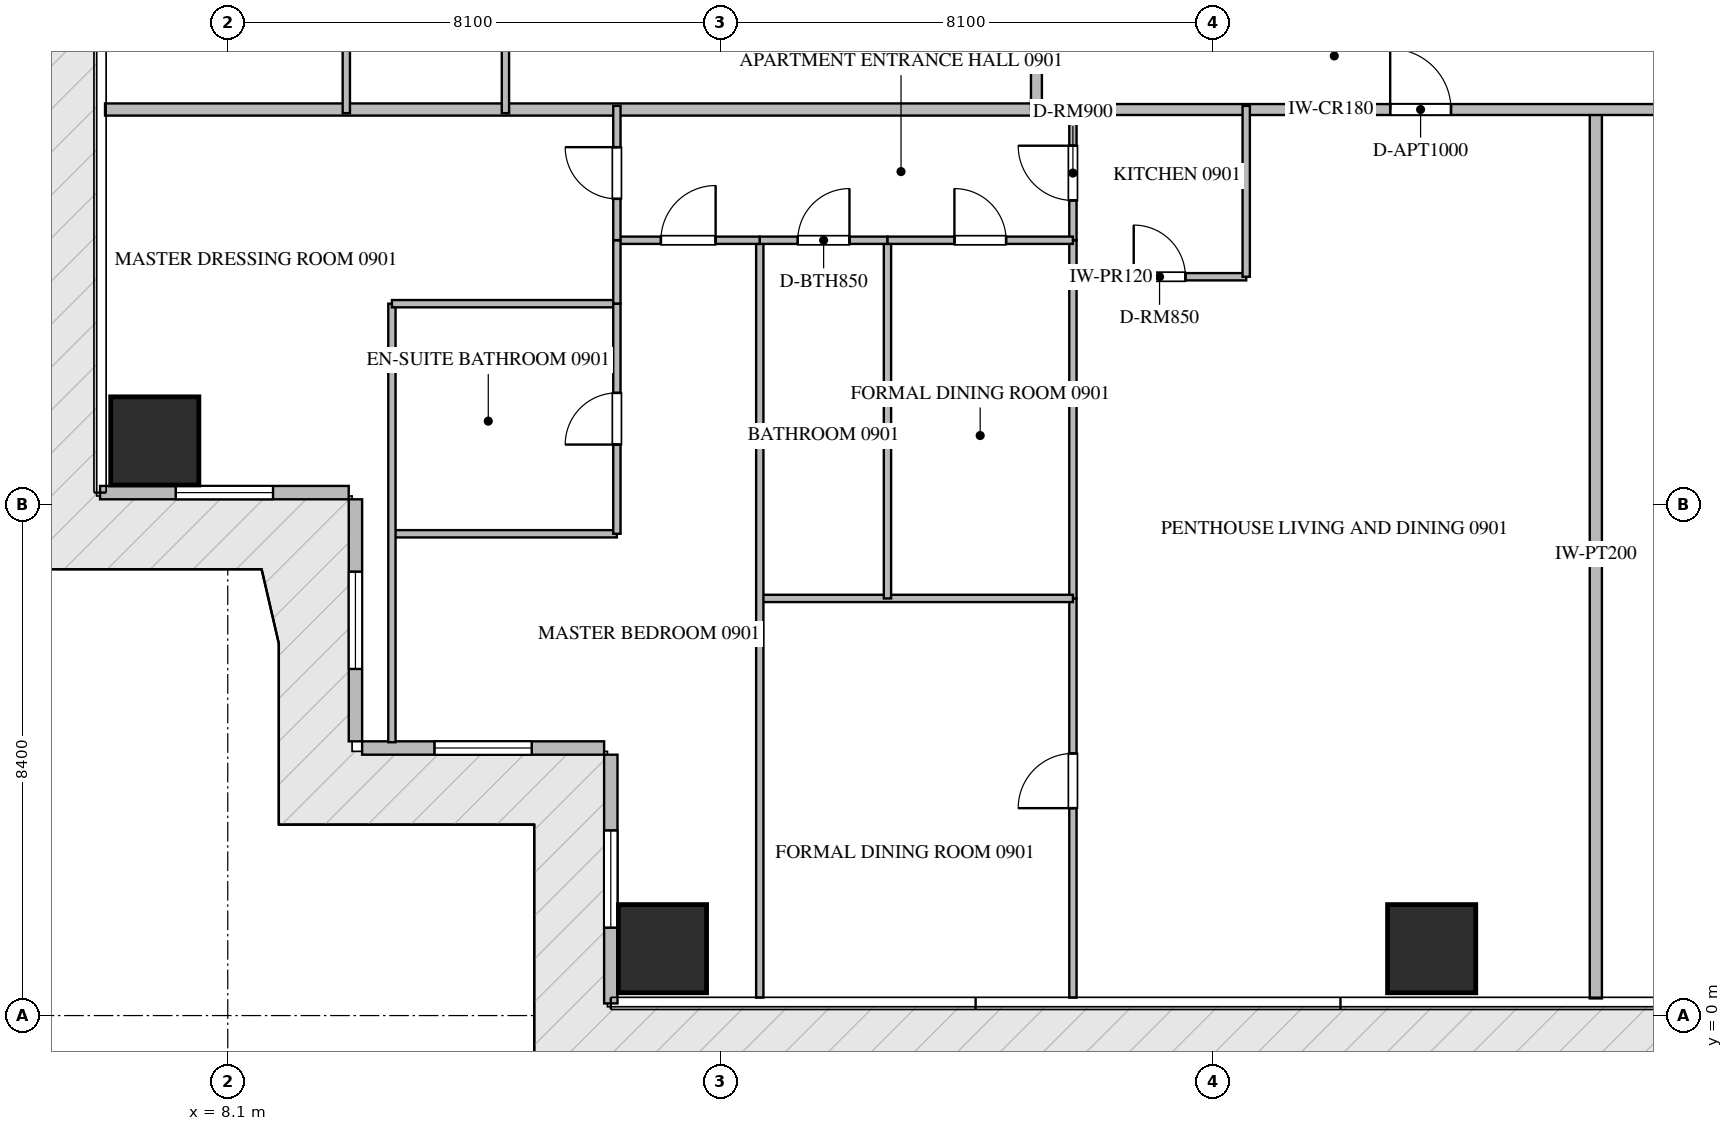
"""IFC4 building model, lengths in metres.
Left out: names, types, materials, properties, quantities, classifications, styles, units other than length and angle.
Written with IfcOpenShell. Run it as: python <this file> out.ifc"""

import sys

from ifc_helpers import new_model, si_unit, direction, frame, frame_2d, origin, origin_2d, place, context, subcontext, project, spatial, rectangle, extrude, source, transform, mapped, element, fill, save


model = new_model("IFC4")
c1 = context("Model", 3, precision=1e-05, world=origin(), true_north=direction((0.0, 1.0)))
c2 = subcontext(c1, "Body", "Model", "MODEL_VIEW")
j1 = project(units=[si_unit("LENGTHUNIT", "METRE"), si_unit("PLANEANGLEUNIT", "RADIAN")], contexts=[c1])
p1 = place(None, origin())
s1 = spatial("IfcSite", under=j1, at=p1, CompositionType="ELEMENT")
p2 = place(p1, origin())
s2 = spatial("IfcBuilding", under=s1, at=p2, CompositionType="ELEMENT")
p3 = place(p2, frame((0.0, 0.0, 41.7)))
s3 = spatial("IfcBuildingStorey", under=s2, at=p3, CompositionType="ELEMENT", Elevation=41.7)
m1 = source(origin(), c2, "Body", "SweptSolid", [
    extrude(rectangle(XDim=1.45, YDim=1.45, at=origin_2d()), origin(), (0.0, 0.0, 1.0), 3.75),
])
for number, where, z_axis, x_axis in (
    (1, (15.25, 1.1, -0.26), (0.0, 0.0, 1.0), (1.0, 0.0, 0.0)),
    (2, (27.9, 1.1, -0.26), (0.0, 0.0, 1.0), (1.0, 0.0, 0.0)),
    (3, (6.9, 9.45, -0.26), (0.0, 0.0, 1.0), (1.0, 0.0, 0.0)),
):
    element("IfcColumn", number, at=place(p3, frame(where, z_axis=z_axis, x_axis=x_axis)), inside=s3, PredefinedType="COLUMN", context=c2, shape_type="MappedRepresentation", body=[
        mapped(m1, transform((0.0, 0.0, 0.0), scale=1.0)),
    ])
p4 = place(p3, frame((6.0, 8.6, 0.0), z_axis=(0.0, 0.0, 1.0), x_axis=(1.0, 0.0, 0.0)))
e4 = element("IfcWall", 4, at=p4, inside=s3, PredefinedType="ELEMENTEDWALL", context=c2, shape_type="SweptSolid", body=[
    extrude(rectangle(XDim=4.09, YDim=0.22, at=frame_2d((2.045, 0.0))), origin(), (0.0, 0.0, 1.0), 3.475),
])
p5 = place(p4, frame((1.245, 0.0, 0.65)))
e5 = element("IfcOpeningElement", 5, at=p5, cuts=e4, PredefinedType="OPENING", context=c2, shape_type="SweptSolid", body=[
    extrude(rectangle(XDim=1.6, YDim=2.1, at=frame_2d((0.8, 1.05))), frame((0.0, 0.12, 0.0), z_axis=(0.0, -1.0, 0.0), x_axis=(1.0, 0.0, 0.0)), (0.0, 0.0, 1.0), 0.24),
])
p6 = place(p3, frame((10.2, 8.49, 0.0), z_axis=(0.0, 0.0, 1.0), x_axis=(0.0, -1.0, 0.0)))
e6 = element("IfcWall", 6, at=p6, inside=s3, PredefinedType="ELEMENTEDWALL", context=c2, shape_type="SweptSolid", body=[
    extrude(rectangle(XDim=3.98, YDim=0.22, at=frame_2d((1.99, 0.0))), origin(), (0.0, 0.0, 1.0), 3.475),
])
p7 = place(p6, frame((1.19, 0.0, 0.65)))
e7 = element("IfcOpeningElement", 7, at=p7, cuts=e6, PredefinedType="OPENING", context=c2, shape_type="SweptSolid", body=[
    extrude(rectangle(XDim=1.6, YDim=2.1, at=frame_2d((0.8, 1.05))), frame((0.0, 0.12, 0.0), z_axis=(0.0, -1.0, 0.0), x_axis=(1.0, 0.0, 0.0)), (0.0, 0.0, 1.0), 0.24),
])
p8 = place(p3, frame((10.31, 4.4, 0.0), z_axis=(0.0, 0.0, 1.0), x_axis=(1.0, 0.0, 0.0)))
e8 = element("IfcWall", 8, at=p8, inside=s3, PredefinedType="ELEMENTEDWALL", context=c2, shape_type="SweptSolid", body=[
    extrude(rectangle(XDim=3.98, YDim=0.22, at=frame_2d((1.99, 0.0))), origin(), (0.0, 0.0, 1.0), 3.475),
])
p9 = place(p8, frame((1.19, 0.0, 0.65)))
e9 = element("IfcOpeningElement", 9, at=p9, cuts=e8, PredefinedType="OPENING", context=c2, shape_type="SweptSolid", body=[
    extrude(rectangle(XDim=1.6, YDim=2.1, at=frame_2d((0.8, 1.05))), frame((0.0, 0.12, 0.0), z_axis=(0.0, -1.0, 0.0), x_axis=(1.0, 0.0, 0.0)), (0.0, 0.0, 1.0), 0.24),
])
p10 = place(p3, frame((14.4, 4.29, 0.0), z_axis=(0.0, 0.0, 1.0), x_axis=(0.0, -1.0, 0.0)))
e10 = element("IfcWall", 10, at=p10, inside=s3, PredefinedType="ELEMENTEDWALL", context=c2, shape_type="SweptSolid", body=[
    extrude(rectangle(XDim=4.09, YDim=0.22, at=frame_2d((2.045, 0.0))), origin(), (0.0, 0.0, 1.0), 3.475),
])
p11 = place(p10, frame((1.245, 0.0, 0.65)))
e11 = element("IfcOpeningElement", 11, at=p11, cuts=e10, PredefinedType="OPENING", context=c2, shape_type="SweptSolid", body=[
    extrude(rectangle(XDim=1.6, YDim=2.1, at=frame_2d((0.8, 1.05))), frame((0.0, 0.12, 0.0), z_axis=(0.0, -1.0, 0.0), x_axis=(1.0, 0.0, 0.0)), (0.0, 0.0, 1.0), 0.24),
])
p12 = place(p3, frame((30.6, 0.282, 0.0), z_axis=(0.0, 0.0, 1.0), x_axis=(0.0, 1.0, 0.0)))
e12 = element("IfcWall", 12, at=p12, inside=s3, PredefinedType="PARTITIONING", context=c2, shape_type="SweptSolid", body=[
    extrude(rectangle(XDim=14.618, YDim=0.2, at=frame_2d((7.309, 0.0))), origin(), (0.0, 0.0, 1.0), 3.49),
])
p13 = place(p3, frame((6.082, 14.9, 0.0), z_axis=(0.0, 0.0, 1.0), x_axis=(1.0, 0.0, 0.0)))
e13 = element("IfcWall", 13, at=p13, inside=s3, PredefinedType="PARTITIONING", context=c2, shape_type="SweptSolid", body=[
    extrude(rectangle(XDim=15.318, YDim=0.2, at=frame_2d((7.659, 0.0))), origin(), (0.0, 0.0, 1.0), 3.49),
])
p14 = place(p3, frame((21.402, 14.9, 0.0), z_axis=(0.0, 0.0, 1.0), x_axis=(1.0, 0.0, 0.0)))
e14 = element("IfcWall", 14, at=p14, inside=s3, PredefinedType="PARTITIONING", context=c2, shape_type="SweptSolid", body=[
    extrude(rectangle(XDim=21.996, YDim=0.18, at=frame_2d((10.998, 0.0))), origin(), (0.0, 0.0, 1.0), 3.49),
])
p15 = place(p14, frame((5.816, 0.0, 0.0)))
e15 = element("IfcOpeningElement", 15, at=p15, cuts=e14, PredefinedType="OPENING", context=c2, shape_type="SweptSolid", body=[
    extrude(rectangle(XDim=1.0, YDim=2.15, at=frame_2d((0.5, 1.075))), frame((0.0, 0.1, 0.0), z_axis=(0.0, -1.0, 0.0), x_axis=(1.0, 0.0, 0.0)), (0.0, 0.0, 1.0), 0.2),
])
p16 = place(p14, frame((11.044, 0.0, 0.0)))
e16 = element("IfcOpeningElement", 16, at=p16, cuts=e14, PredefinedType="OPENING", context=c2, shape_type="SweptSolid", body=[
    extrude(rectangle(XDim=1.0, YDim=2.15, at=frame_2d((0.5, 1.075))), frame((0.0, 0.1, 0.0), z_axis=(0.0, -1.0, 0.0), x_axis=(1.0, 0.0, 0.0)), (0.0, 0.0, 1.0), 0.2),
])
p17 = place(p3, frame((21.4, 14.9, 0.0), z_axis=(0.0, 0.0, 1.0), x_axis=(0.0, 1.0, 0.0)))
e17 = element("IfcWall", 17, at=p17, inside=s3, PredefinedType="PARTITIONING", context=c2, shape_type="SweptSolid", body=[
    extrude(rectangle(XDim=20.6, YDim=0.18, at=frame_2d((10.3, 0.0))), origin(), (0.0, 0.0, 1.0), 3.49),
])
p18 = place(p17, frame((17.64, 0.0, 0.0)))
e18 = element("IfcOpeningElement", 18, at=p18, cuts=e17, PredefinedType="OPENING", context=c2, shape_type="SweptSolid", body=[
    extrude(rectangle(XDim=1.0, YDim=2.15, at=frame_2d((0.5, 1.075))), frame((0.0, 0.1, 0.0), z_axis=(0.0, -1.0, 0.0), x_axis=(1.0, 0.0, 0.0)), (0.0, 0.0, 1.0), 0.2),
])
p19 = place(p3, frame((22.0, 12.15, 0.0), z_axis=(0.0, 0.0, 1.0), x_axis=(1.0, 0.0, 0.0)))
e19 = element("IfcWall", 19, at=p19, inside=s3, PredefinedType="PARTITIONING", context=c2, shape_type="SweptSolid", body=[
    extrude(rectangle(XDim=2.85, YDim=0.12, at=frame_2d((1.425, 0.0))), origin(), (0.0, 0.0, 1.0), 3.49),
])
p20 = place(p19, frame((1.0, 0.0, 0.0)))
e20 = element("IfcOpeningElement", 20, at=p20, cuts=e19, PredefinedType="OPENING", context=c2, shape_type="SweptSolid", body=[
    extrude(rectangle(XDim=0.85, YDim=2.1, at=frame_2d((0.425, 1.05))), frame((0.0, 0.07, 0.0), z_axis=(0.0, -1.0, 0.0), x_axis=(1.0, 0.0, 0.0)), (0.0, 0.0, 1.0), 0.14),
])
p21 = place(p3, frame((24.85, 12.15, 0.0), z_axis=(0.0, 0.0, 1.0), x_axis=(0.0, 1.0, 0.0)))
e21 = element("IfcWall", 21, at=p21, inside=s3, PredefinedType="PARTITIONING", context=c2, shape_type="SweptSolid", body=[
    extrude(rectangle(XDim=2.81, YDim=0.12, at=frame_2d((1.405, 0.0))), origin(), (0.0, 0.0, 1.0), 3.49),
])
p22 = place(p3, frame((22.0, 12.75, 0.0), z_axis=(0.0, 0.0, 1.0), x_axis=(0.0, 1.0, 0.0)))
e22 = element("IfcWall", 22, at=p22, inside=s3, PredefinedType="PARTITIONING", context=c2, shape_type="SweptSolid", body=[
    extrude(rectangle(XDim=2.21, YDim=0.12, at=frame_2d((1.105, 0.0))), origin(), (0.0, 0.0, 1.0), 3.49),
])
p23 = place(p22, frame((0.655, 0.0, 0.0)))
e23 = element("IfcOpeningElement", 23, at=p23, cuts=e22, PredefinedType="OPENING", context=c2, shape_type="SweptSolid", body=[
    extrude(rectangle(XDim=0.9, YDim=2.1, at=frame_2d((0.45, 1.05))), frame((0.0, 0.07, 0.0), z_axis=(0.0, -1.0, 0.0), x_axis=(1.0, 0.0, 0.0)), (0.0, 0.0, 1.0), 0.14),
])
p24 = place(p3, frame((22.0, 0.295, 0.0), z_axis=(0.0, 0.0, 1.0), x_axis=(0.0, 1.0, 0.0)))
e24 = element("IfcWall", 24, at=p24, inside=s3, PredefinedType="PARTITIONING", context=c2, shape_type="SweptSolid", body=[
    extrude(rectangle(XDim=6.565, YDim=0.12, at=frame_2d((3.283, 0.0))), origin(), (0.0, 0.0, 1.0), 3.49),
])
p25 = place(p24, frame((3.116, 0.0, 0.0)))
e25 = element("IfcOpeningElement", 25, at=p25, cuts=e24, PredefinedType="OPENING", context=c2, shape_type="SweptSolid", body=[
    extrude(rectangle(XDim=0.9, YDim=2.1, at=frame_2d((0.45, 1.05))), frame((0.0, 0.07, 0.0), z_axis=(0.0, -1.0, 0.0), x_axis=(1.0, 0.0, 0.0)), (0.0, 0.0, 1.0), 0.14),
])
p26 = place(p3, frame((22.0, 6.862, 0.0), z_axis=(0.0, 0.0, 1.0), x_axis=(0.0, 1.0, 0.0)))
e26 = element("IfcWall", 26, at=p26, inside=s3, PredefinedType="PARTITIONING", context=c2, shape_type="SweptSolid", body=[
    extrude(rectangle(XDim=5.886, YDim=0.12, at=frame_2d((2.943, 0.0))), origin(), (0.0, 0.0, 1.0), 3.49),
])
p27 = place(p3, frame((16.85, 6.86, 0.0), z_axis=(0.0, 0.0, 1.0), x_axis=(1.0, 0.0, 0.0)))
e27 = element("IfcWall", 27, at=p27, inside=s3, PredefinedType="PARTITIONING", context=c2, shape_type="SweptSolid", body=[
    extrude(rectangle(XDim=5.15, YDim=0.12, at=frame_2d((2.575, 0.0))), origin(), (0.0, 0.0, 1.0), 3.49),
])
p28 = place(p3, frame((16.85, 0.295, 0.0), z_axis=(0.0, 0.0, 1.0), x_axis=(0.0, 1.0, 0.0)))
e28 = element("IfcWall", 28, at=p28, inside=s3, PredefinedType="PARTITIONING", context=c2, shape_type="SweptSolid", body=[
    extrude(rectangle(XDim=12.455, YDim=0.12, at=frame_2d((6.228, 0.0))), origin(), (0.0, 0.0, 1.0), 3.49),
])
p29 = place(p3, frame((18.95, 6.86, 0.0), z_axis=(0.0, 0.0, 1.0), x_axis=(0.0, 1.0, 0.0)))
e29 = element("IfcWall", 29, at=p29, inside=s3, PredefinedType="PARTITIONING", context=c2, shape_type="SweptSolid", body=[
    extrude(rectangle(XDim=5.89, YDim=0.12, at=frame_2d((2.945, 0.0))), origin(), (0.0, 0.0, 1.0), 3.49),
])
p30 = place(p3, frame((16.85, 12.75, 0.0), z_axis=(0.0, 0.0, 1.0), x_axis=(1.0, 0.0, 0.0)))
e30 = element("IfcWall", 30, at=p30, inside=s3, PredefinedType="PARTITIONING", context=c2, shape_type="SweptSolid", body=[
    extrude(rectangle(XDim=2.1, YDim=0.12, at=frame_2d((1.05, 0.0))), origin(), (0.0, 0.0, 1.0), 3.49),
])
p31 = place(p30, frame((0.625, 0.0, 0.0)))
e31 = element("IfcOpeningElement", 31, at=p31, cuts=e30, PredefinedType="OPENING", context=c2, shape_type="SweptSolid", body=[
    extrude(rectangle(XDim=0.85, YDim=2.1, at=frame_2d((0.425, 1.05))), frame((0.0, 0.07, 0.0), z_axis=(0.0, -1.0, 0.0), x_axis=(1.0, 0.0, 0.0)), (0.0, 0.0, 1.0), 0.14),
])
p32 = place(p3, frame((18.952, 12.75, 0.0), z_axis=(0.0, 0.0, 1.0), x_axis=(1.0, 0.0, 0.0)))
e32 = element("IfcWall", 32, at=p32, inside=s3, PredefinedType="PARTITIONING", context=c2, shape_type="SweptSolid", body=[
    extrude(rectangle(XDim=3.048, YDim=0.12, at=frame_2d((1.524, 0.0))), origin(), (0.0, 0.0, 1.0), 3.49),
])
p33 = place(p32, frame((1.099, 0.0, 0.0)))
e33 = element("IfcOpeningElement", 33, at=p33, cuts=e32, PredefinedType="OPENING", context=c2, shape_type="SweptSolid", body=[
    extrude(rectangle(XDim=0.85, YDim=2.1, at=frame_2d((0.425, 1.05))), frame((0.0, 0.07, 0.0), z_axis=(0.0, -1.0, 0.0), x_axis=(1.0, 0.0, 0.0)), (0.0, 0.0, 1.0), 0.14),
])
p34 = place(p3, frame((14.5, 12.75, 0.0), z_axis=(0.0, 0.0, 1.0), x_axis=(1.0, 0.0, 0.0)))
e34 = element("IfcWall", 34, at=p34, inside=s3, PredefinedType="PARTITIONING", context=c2, shape_type="SweptSolid", body=[
    extrude(rectangle(XDim=2.348, YDim=0.12, at=frame_2d((1.174, 0.0))), origin(), (0.0, 0.0, 1.0), 3.49),
])
p35 = place(p34, frame((0.724, 0.0, 0.0)))
e35 = element("IfcOpeningElement", 35, at=p35, cuts=e34, PredefinedType="OPENING", context=c2, shape_type="SweptSolid", body=[
    extrude(rectangle(XDim=0.9, YDim=2.1, at=frame_2d((0.45, 1.05))), frame((0.0, 0.07, 0.0), z_axis=(0.0, -1.0, 0.0), x_axis=(1.0, 0.0, 0.0)), (0.0, 0.0, 1.0), 0.14),
])
p36 = place(p3, frame((10.8, 7.923, 0.0), z_axis=(0.0, 0.0, 1.0), x_axis=(1.0, 0.0, 0.0)))
e36 = element("IfcWall", 36, at=p36, inside=s3, PredefinedType="PARTITIONING", context=c2, shape_type="SweptSolid", body=[
    extrude(rectangle(XDim=3.7, YDim=0.12, at=frame_2d((1.85, 0.0))), origin(), (0.0, 0.0, 1.0), 3.49),
])
p37 = place(p3, frame((10.8, 4.495, 0.0), z_axis=(0.0, 0.0, 1.0), x_axis=(0.0, 1.0, 0.0)))
e37 = element("IfcWall", 37, at=p37, inside=s3, PredefinedType="PARTITIONING", context=c2, shape_type="SweptSolid", body=[
    extrude(rectangle(XDim=7.212, YDim=0.12, at=frame_2d((3.606, 0.0))), origin(), (0.0, 0.0, 1.0), 3.49),
])
p38 = place(p3, frame((10.8, 11.707, 0.0), z_axis=(0.0, 0.0, 1.0), x_axis=(1.0, 0.0, 0.0)))
e38 = element("IfcWall", 38, at=p38, inside=s3, PredefinedType="PARTITIONING", context=c2, shape_type="SweptSolid", body=[
    extrude(rectangle(XDim=3.7, YDim=0.12, at=frame_2d((1.85, 0.0))), origin(), (0.0, 0.0, 1.0), 3.49),
])
p39 = place(p3, frame((14.5, 7.923, 0.0), z_axis=(0.0, 0.0, 1.0), x_axis=(0.0, 1.0, 0.0)))
e39 = element("IfcWall", 39, at=p39, inside=s3, PredefinedType="PARTITIONING", context=c2, shape_type="SweptSolid", body=[
    extrude(rectangle(XDim=3.784, YDim=0.12, at=frame_2d((1.892, 0.0))), origin(), (0.0, 0.0, 1.0), 3.49),
])
p40 = place(p39, frame((1.467, 0.0, 0.0)))
e40 = element("IfcOpeningElement", 40, at=p40, cuts=e39, PredefinedType="OPENING", context=c2, shape_type="SweptSolid", body=[
    extrude(rectangle(XDim=0.85, YDim=2.1, at=frame_2d((0.425, 1.05))), frame((0.0, 0.07, 0.0), z_axis=(0.0, -1.0, 0.0), x_axis=(1.0, 0.0, 0.0)), (0.0, 0.0, 1.0), 0.14),
])
p41 = place(p3, frame((14.5, 11.709, 0.0), z_axis=(0.0, 0.0, 1.0), x_axis=(0.0, 1.0, 0.0)))
e41 = element("IfcWall", 41, at=p41, inside=s3, PredefinedType="PARTITIONING", context=c2, shape_type="SweptSolid", body=[
    extrude(rectangle(XDim=1.041, YDim=0.12, at=frame_2d((0.521, 0.0))), origin(), (0.0, 0.0, 1.0), 3.49),
])
p42 = place(p3, frame((14.5, 12.752, 0.0), z_axis=(0.0, 0.0, 1.0), x_axis=(0.0, 1.0, 0.0)))
e42 = element("IfcWall", 42, at=p42, inside=s3, PredefinedType="PARTITIONING", context=c2, shape_type="SweptSolid", body=[
    extrude(rectangle(XDim=2.208, YDim=0.12, at=frame_2d((1.104, 0.0))), origin(), (0.0, 0.0, 1.0), 3.49),
])
p43 = place(p42, frame((0.679, 0.0, 0.0)))
e43 = element("IfcOpeningElement", 43, at=p43, cuts=e42, PredefinedType="OPENING", context=c2, shape_type="SweptSolid", body=[
    extrude(rectangle(XDim=0.85, YDim=2.1, at=frame_2d((0.425, 1.05))), frame((0.0, 0.07, 0.0), z_axis=(0.0, -1.0, 0.0), x_axis=(1.0, 0.0, 0.0)), (0.0, 0.0, 1.0), 0.14),
])
for number, where, z_axis, x_axis in (
    (44, (10.05, 14.84, 0.0), (0.0, 0.0, 1.0), (0.0, 1.0, 0.0)),
    (45, (12.667, 14.84, 0.0), (0.0, 0.0, 1.0), (0.0, 1.0, 0.0)),
):
    element("IfcWall", number, at=place(p3, frame(where, z_axis=z_axis, x_axis=x_axis)), inside=s3, PredefinedType="PARTITIONING", context=c2, shape_type="SweptSolid", body=[
        extrude(rectangle(XDim=5.41, YDim=0.12, at=frame_2d((2.705, 0.0))), origin(), (0.0, 0.0, 1.0), 3.49),
    ])
m2 = source(origin(), c2, "Body", "SweptSolid", [
    extrude(rectangle(XDim=1.6, YDim=2.1, at=frame_2d((0.8, 1.05))), frame((0.0, 0.03, 0.0), z_axis=(0.0, -1.0, 0.0), x_axis=(1.0, 0.0, 0.0)), (0.0, 0.0, 1.0), 0.06),
])
p44 = place(p5, origin())
e46 = element("IfcWindow", 46, at=p44, inside=s3, PartitioningType="SINGLE_PANEL", PredefinedType="WINDOW", context=c2, shape_type="MappedRepresentation", body=[
    mapped(m2, transform((0.0, 0.0, 0.0), scale=1.0)),
])
fill(e5, e46)
p45 = place(p7, origin())
e47 = element("IfcWindow", 47, at=p45, inside=s3, PartitioningType="SINGLE_PANEL", PredefinedType="WINDOW", context=c2, shape_type="MappedRepresentation", body=[
    mapped(m2, transform((0.0, 0.0, 0.0), scale=1.0)),
])
fill(e7, e47)
p46 = place(p9, origin())
e48 = element("IfcWindow", 48, at=p46, inside=s3, PartitioningType="SINGLE_PANEL", PredefinedType="WINDOW", context=c2, shape_type="MappedRepresentation", body=[
    mapped(m2, transform((0.0, 0.0, 0.0), scale=1.0)),
])
fill(e9, e48)
p47 = place(p11, origin())
e49 = element("IfcWindow", 49, at=p47, inside=s3, PartitioningType="SINGLE_PANEL", PredefinedType="WINDOW", context=c2, shape_type="MappedRepresentation", body=[
    mapped(m2, transform((0.0, 0.0, 0.0), scale=1.0)),
])
fill(e11, e49)
m3 = source(origin(), c2, "Body", "SweptSolid", [
    extrude(rectangle(XDim=1.0, YDim=2.15, at=frame_2d((0.5, 1.075))), frame((0.0, 0.025, 0.0), z_axis=(0.0, -1.0, 0.0), x_axis=(1.0, 0.0, 0.0)), (0.0, 0.0, 1.0), 0.05),
])
p48 = place(p15, origin())
e50 = element("IfcDoor", 50, at=p48, inside=s3, OperationType="SINGLE_SWING_LEFT", PredefinedType="DOOR", context=c2, shape_type="MappedRepresentation", body=[
    mapped(m3, transform((0.0, 0.0, 0.0), scale=1.0)),
])
fill(e15, e50)
m4 = source(origin(), c2, "Body", "SweptSolid", [
    extrude(rectangle(XDim=0.85, YDim=2.1, at=frame_2d((0.425, 1.05))), frame((0.0, 0.025, 0.0), z_axis=(0.0, -1.0, 0.0), x_axis=(1.0, 0.0, 0.0)), (0.0, 0.0, 1.0), 0.05),
])
p49 = place(p20, origin())
e51 = element("IfcDoor", 51, at=p49, inside=s3, OperationType="SINGLE_SWING_LEFT", PredefinedType="DOOR", context=c2, shape_type="MappedRepresentation", body=[
    mapped(m4, transform((0.0, 0.0, 0.0), scale=1.0)),
])
fill(e20, e51)
m5 = source(origin(), c2, "Body", "SweptSolid", [
    extrude(rectangle(XDim=0.9, YDim=2.1, at=frame_2d((0.45, 1.05))), frame((0.0, 0.025, 0.0), z_axis=(0.0, -1.0, 0.0), x_axis=(1.0, 0.0, 0.0)), (0.0, 0.0, 1.0), 0.05),
])
p50 = place(p23, origin())
e52 = element("IfcDoor", 52, at=p50, inside=s3, OperationType="SINGLE_SWING_RIGHT", PredefinedType="DOOR", context=c2, shape_type="MappedRepresentation", body=[
    mapped(m5, transform((0.0, 0.0, 0.0), scale=1.0)),
])
fill(e23, e52)
p51 = place(p25, origin())
e53 = element("IfcDoor", 53, at=p51, inside=s3, OperationType="SINGLE_SWING_LEFT", PredefinedType="DOOR", context=c2, shape_type="MappedRepresentation", body=[
    mapped(m5, transform((0.0, 0.0, 0.0), scale=1.0)),
])
fill(e25, e53)
p52 = place(p31, origin())
e54 = element("IfcDoor", 54, at=p52, inside=s3, OperationType="SINGLE_SWING_RIGHT", PredefinedType="DOOR", context=c2, shape_type="MappedRepresentation", body=[
    mapped(m4, transform((0.0, 0.0, 0.0), scale=1.0)),
])
fill(e31, e54)
p53 = place(p33, origin())
e55 = element("IfcDoor", 55, at=p53, inside=s3, OperationType="SINGLE_SWING_LEFT", PredefinedType="DOOR", context=c2, shape_type="MappedRepresentation", body=[
    mapped(m4, transform((0.0, 0.0, 0.0), scale=1.0)),
])
fill(e33, e55)
p54 = place(p35, origin())
e56 = element("IfcDoor", 56, at=p54, inside=s3, OperationType="SINGLE_SWING_RIGHT", PredefinedType="DOOR", context=c2, shape_type="MappedRepresentation", body=[
    mapped(m5, transform((0.0, 0.0, 0.0), scale=1.0)),
])
fill(e35, e56)
p55 = place(p40, origin())
e57 = element("IfcDoor", 57, at=p55, inside=s3, OperationType="SINGLE_SWING_LEFT", PredefinedType="DOOR", context=c2, shape_type="MappedRepresentation", body=[
    mapped(m4, transform((0.0, 0.0, 0.0), scale=1.0)),
])
fill(e40, e57)
p56 = place(p43, origin())
e58 = element("IfcDoor", 58, at=p56, inside=s3, OperationType="SINGLE_SWING_RIGHT", PredefinedType="DOOR", context=c2, shape_type="MappedRepresentation", body=[
    mapped(m4, transform((0.0, 0.0, 0.0), scale=1.0)),
])
fill(e43, e58)
save(model, sys.argv[1])
